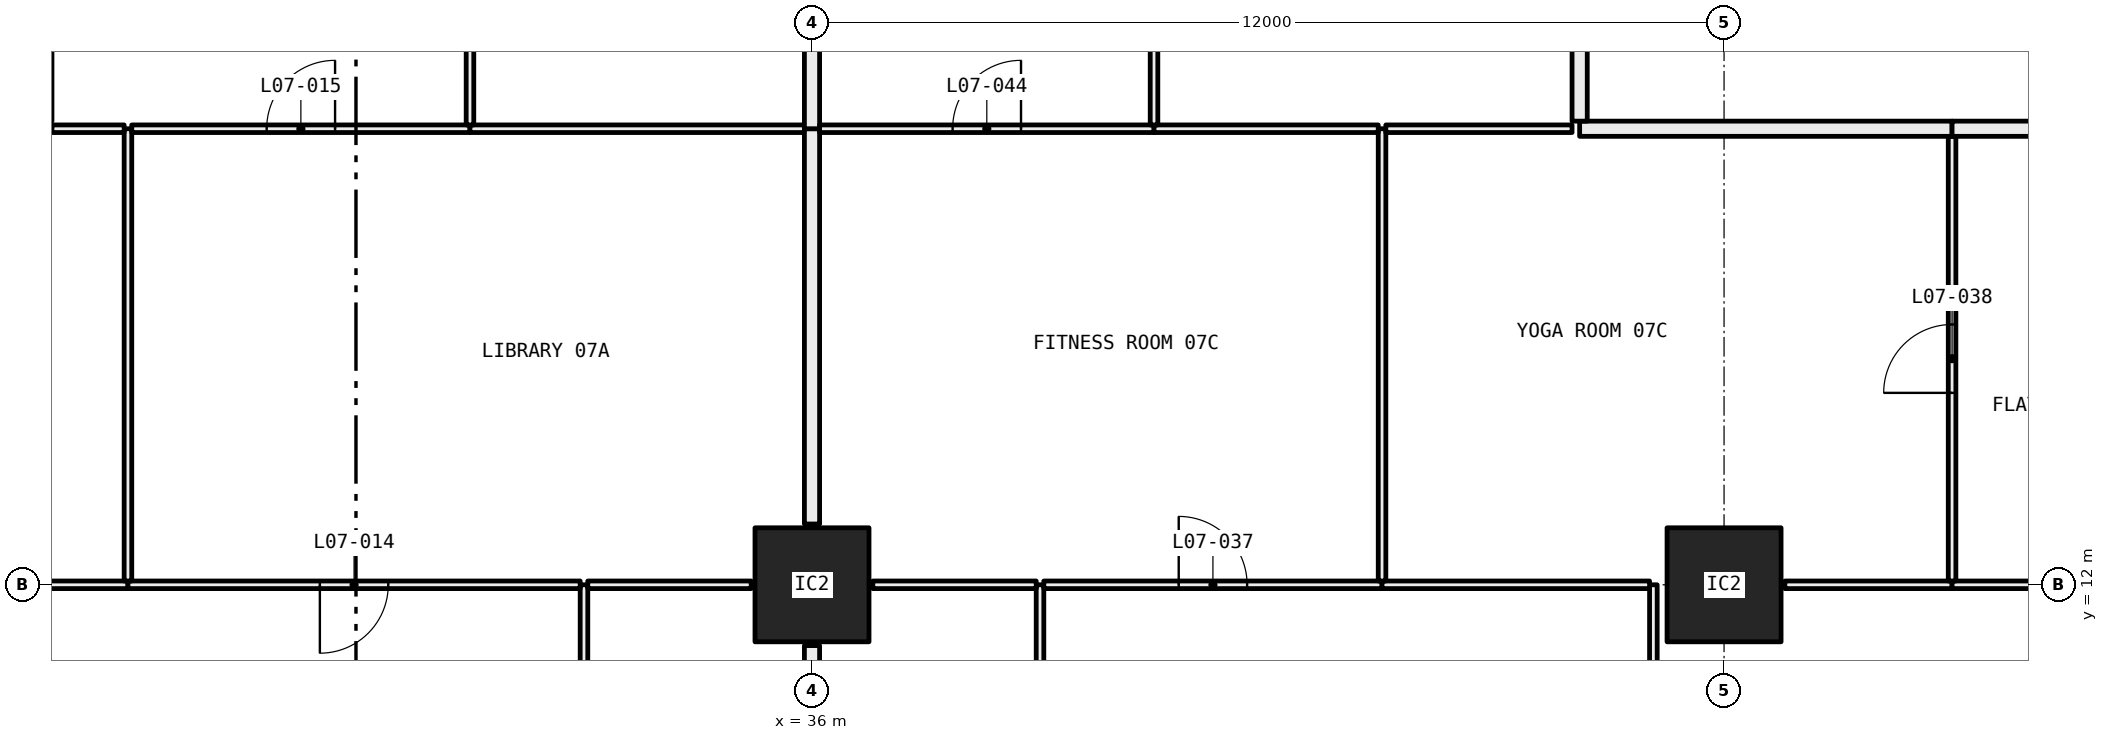
"""IFC4 building model, lengths in metres.
Left out: names, types, materials, properties, quantities, classifications, styles, units other than length and angle.
Written with IfcOpenShell. Run it as: python <this file> out.ifc"""

import sys

from ifc_helpers import new_model, si_unit, direction, frame, frame_2d, origin, origin_2d, place, context, subcontext, project, spatial, rectangle, hollow_rectangle, extrude, element, fill, save


model = new_model("IFC4")
c1 = context("Model", 3, precision=1e-05, world=origin(), true_north=direction((0.0, 1.0)))
c2 = subcontext(c1, "Body", "Model", "MODEL_VIEW")
j1 = project(units=[si_unit("LENGTHUNIT", "METRE"), si_unit("PLANEANGLEUNIT", "RADIAN")], contexts=[c1])
p1 = place(None, origin())
s1 = spatial("IfcSite", under=j1, at=p1, CompositionType="ELEMENT")
p2 = place(p1, origin())
s2 = spatial("IfcBuilding", under=s1, at=p2, CompositionType="ELEMENT")
p3 = place(p2, frame((0.0, 0.0, 36.9)))
s3 = spatial("IfcBuildingStorey", under=s2, at=p3, CompositionType="ELEMENT", Elevation=36.9)
for number, where, z_axis, x_axis in (
    (1, (36.0, 12.0, 0.0), (0.0, 0.0, 1.0), (1.0, 0.0, 0.0)),
    (2, (48.0, 12.0, 0.0), (0.0, 0.0, 1.0), (1.0, 0.0, 0.0)),
):
    element("IfcColumn", number, at=place(p3, frame(where, z_axis=z_axis, x_axis=x_axis)), inside=s3, PredefinedType="COLUMN", context=c2, shape_type="SweptSolid", body=[
        extrude(hollow_rectangle(XDim=1.5, YDim=1.5, WallThickness=0.065, at=origin_2d()), origin(), (0.0, 0.0, 1.0), 3.05),
    ])
p4 = place(p3, frame((33.0, 6.05, 0.0), z_axis=(0.0, 0.0, 1.0), x_axis=(0.0, 1.0, 0.0)))
e3 = element("IfcWall", 3, at=p4, inside=s3, PredefinedType="PARTITIONING", context=c2, shape_type="SweptSolid", body=[
    extrude(rectangle(XDim=5.95, YDim=0.1, at=frame_2d((2.975, 0.0))), origin(), (0.0, 0.0, 1.0), 2.45),
])
p5 = place(p4, frame((2.525, 0.0, 0.0)))
e4 = element("IfcOpeningElement", 4, at=p5, cuts=e3, PredefinedType="OPENING", context=c2, shape_type="SweptSolid", body=[
    extrude(rectangle(XDim=0.9, YDim=2.1, at=frame_2d((0.45, 1.05))), frame((0.0, 0.06, 0.0), z_axis=(0.0, -1.0, 0.0), x_axis=(1.0, 0.0, 0.0)), (0.0, 0.0, 1.0), 0.12),
])
p6 = place(p3, frame((27.0, 12.0, 0.0), z_axis=(0.0, 0.0, 1.0), x_axis=(-1.0, 0.0, 0.0)))
e5 = element("IfcWall", 5, at=p6, inside=s3, PredefinedType="PARTITIONING", context=c2, shape_type="SweptSolid", body=[
    extrude(rectangle(XDim=2.2, YDim=0.1, at=frame_2d((1.1, 0.0))), origin(), (0.0, 0.0, 1.0), 2.45),
])
p7 = place(p3, frame((32.95, 12.0, 0.0), z_axis=(0.0, 0.0, 1.0), x_axis=(-1.0, 0.0, 0.0)))
e6 = element("IfcWall", 6, at=p7, inside=s3, PredefinedType="PARTITIONING", context=c2, shape_type="SweptSolid", body=[
    extrude(rectangle(XDim=5.95, YDim=0.1, at=frame_2d((2.975, 0.0))), origin(), (0.0, 0.0, 1.0), 2.45),
])
p8 = place(p7, frame((2.525, 0.0, 0.0)))
e7 = element("IfcOpeningElement", 7, at=p8, cuts=e6, PredefinedType="OPENING", context=c2, shape_type="SweptSolid", body=[
    extrude(rectangle(XDim=0.9, YDim=2.1, at=frame_2d((0.45, 1.05))), frame((0.0, 0.06, 0.0), z_axis=(0.0, -1.0, 0.0), x_axis=(1.0, 0.0, 0.0)), (0.0, 0.0, 1.0), 0.12),
])
p9 = place(p3, frame((35.2, 12.0, 0.0), z_axis=(0.0, 0.0, 1.0), x_axis=(-1.0, 0.0, 0.0)))
e8 = element("IfcWall", 8, at=p9, inside=s3, PredefinedType="PARTITIONING", context=c2, shape_type="SweptSolid", body=[
    extrude(rectangle(XDim=2.15, YDim=0.1, at=frame_2d((1.075, 0.0))), origin(), (0.0, 0.0, 1.0), 2.45),
])
p10 = place(p3, frame((36.0, 6.0, 0.0), z_axis=(0.0, 0.0, 1.0), x_axis=(0.0, 1.0, 0.0)))
e9 = element("IfcWall", 9, at=p10, inside=s3, PredefinedType="PARTITIONING", context=c2, shape_type="SweptSolid", body=[
    extrude(rectangle(XDim=5.2, YDim=0.2, at=frame_2d((2.6, 0.0))), origin(), (0.0, 0.0, 1.0), 2.45),
])
p11 = place(p3, frame((27.0, 12.05, 0.0), z_axis=(0.0, 0.0, 1.0), x_axis=(0.0, 1.0, 0.0)))
e10 = element("IfcWall", 10, at=p11, inside=s3, PredefinedType="PARTITIONING", context=c2, shape_type="SweptSolid", body=[
    extrude(rectangle(XDim=5.95, YDim=0.1, at=frame_2d((2.975, 0.0))), origin(), (0.0, 0.0, 1.0), 2.45),
])
p12 = place(p3, frame((26.95, 18.0, 0.0), z_axis=(0.0, 0.0, 1.0), x_axis=(-1.0, 0.0, 0.0)))
e11 = element("IfcWall", 11, at=p12, inside=s3, PredefinedType="PARTITIONING", context=c2, shape_type="SweptSolid", body=[
    extrude(rectangle(XDim=0.95, YDim=0.1, at=frame_2d((0.475, 0.0))), origin(), (0.0, 0.0, 1.0), 3.05),
])
p13 = place(p3, frame((31.5, 18.0, 0.0), z_axis=(0.0, 0.0, 1.0), x_axis=(-1.0, 0.0, 0.0)))
e12 = element("IfcWall", 12, at=p13, inside=s3, PredefinedType="PARTITIONING", context=c2, shape_type="SweptSolid", body=[
    extrude(rectangle(XDim=4.45, YDim=0.1, at=frame_2d((2.225, 0.0))), origin(), (0.0, 0.0, 1.0), 3.05),
])
p14 = place(p13, frame((1.775, 0.0, 0.0)))
e13 = element("IfcOpeningElement", 13, at=p14, cuts=e12, PredefinedType="OPENING", context=c2, shape_type="SweptSolid", body=[
    extrude(rectangle(XDim=0.9, YDim=2.1, at=frame_2d((0.45, 1.05))), frame((0.0, 0.06, 0.0), z_axis=(0.0, -1.0, 0.0), x_axis=(1.0, 0.0, 0.0)), (0.0, 0.0, 1.0), 0.12),
])
p15 = place(p3, frame((35.9, 18.0, 0.0), z_axis=(0.0, 0.0, 1.0), x_axis=(-1.0, 0.0, 0.0)))
e14 = element("IfcWall", 14, at=p15, inside=s3, PredefinedType="PARTITIONING", context=c2, shape_type="SweptSolid", body=[
    extrude(rectangle(XDim=4.4, YDim=0.1, at=frame_2d((2.2, 0.0))), origin(), (0.0, 0.0, 1.0), 3.05),
])
p16 = place(p3, frame((36.0, 12.8, 0.0), z_axis=(0.0, 0.0, 1.0), x_axis=(0.0, 1.0, 0.0)))
e15 = element("IfcWall", 15, at=p16, inside=s3, PredefinedType="PARTITIONING", context=c2, shape_type="SweptSolid", body=[
    extrude(rectangle(XDim=5.2, YDim=0.2, at=frame_2d((2.6, 0.0))), origin(), (0.0, 0.0, 1.0), 2.45),
])
p17 = place(p3, frame((31.5, 18.05, 0.0), z_axis=(0.0, 0.0, 1.0), x_axis=(0.0, 1.0, 0.0)))
e16 = element("IfcWall", 16, at=p17, inside=s3, PredefinedType="PARTITIONING", context=c2, shape_type="SweptSolid", body=[
    extrude(rectangle(XDim=6.25, YDim=0.1, at=frame_2d((3.125, 0.0))), origin(), (0.0, 0.0, 1.0), 2.45),
])
p18 = place(p17, frame((2.675, 0.0, 0.0)))
e17 = element("IfcOpeningElement", 17, at=p18, cuts=e16, PredefinedType="OPENING", context=c2, shape_type="SweptSolid", body=[
    extrude(rectangle(XDim=0.9, YDim=2.1, at=frame_2d((0.45, 1.05))), frame((0.0, 0.06, 0.0), z_axis=(0.0, -1.0, 0.0), x_axis=(1.0, 0.0, 0.0)), (0.0, 0.0, 1.0), 0.12),
])
p19 = place(p3, frame((36.0, 18.0, 0.0), z_axis=(0.0, 0.0, 1.0), x_axis=(0.0, 1.0, 0.0)))
e18 = element("IfcWall", 18, at=p19, inside=s3, PredefinedType="PARTITIONING", context=c2, shape_type="SweptSolid", body=[
    extrude(rectangle(XDim=5.2, YDim=0.2, at=frame_2d((2.6, 0.0))), origin(), (0.0, 0.0, 1.0), 2.45),
])
p20 = place(p3, frame((39.0, 6.05, 0.0), z_axis=(0.0, 0.0, 1.0), x_axis=(0.0, 1.0, 0.0)))
e19 = element("IfcWall", 19, at=p20, inside=s3, PredefinedType="PARTITIONING", context=c2, shape_type="SweptSolid", body=[
    extrude(rectangle(XDim=5.95, YDim=0.1, at=frame_2d((2.975, 0.0))), origin(), (0.0, 0.0, 1.0), 2.45),
])
p21 = place(p20, frame((2.525, 0.0, 0.0)))
e20 = element("IfcOpeningElement", 20, at=p21, cuts=e19, PredefinedType="OPENING", context=c2, shape_type="SweptSolid", body=[
    extrude(rectangle(XDim=0.9, YDim=2.1, at=frame_2d((0.45, 1.05))), frame((0.0, 0.06, 0.0), z_axis=(0.0, -1.0, 0.0), x_axis=(1.0, 0.0, 0.0)), (0.0, 0.0, 1.0), 0.12),
])
p22 = place(p3, frame((38.95, 12.0, 0.0), z_axis=(0.0, 0.0, 1.0), x_axis=(-1.0, 0.0, 0.0)))
e21 = element("IfcWall", 21, at=p22, inside=s3, PredefinedType="PARTITIONING", context=c2, shape_type="SweptSolid", body=[
    extrude(rectangle(XDim=2.15, YDim=0.1, at=frame_2d((1.075, 0.0))), origin(), (0.0, 0.0, 1.0), 2.45),
])
p23 = place(p3, frame((47.07, 6.05, 0.0), z_axis=(0.0, 0.0, 1.0), x_axis=(0.0, 1.0, 0.0)))
e22 = element("IfcWall", 22, at=p23, inside=s3, PredefinedType="PARTITIONING", context=c2, shape_type="SweptSolid", body=[
    extrude(rectangle(XDim=5.95, YDim=0.1, at=frame_2d((2.975, 0.0))), origin(), (0.0, 0.0, 1.0), 2.45),
])
p24 = place(p23, frame((2.525, 0.0, 0.0)))
e23 = element("IfcOpeningElement", 23, at=p24, cuts=e22, PredefinedType="OPENING", context=c2, shape_type="SweptSolid", body=[
    extrude(rectangle(XDim=0.9, YDim=2.1, at=frame_2d((0.45, 1.05))), frame((0.0, 0.06, 0.0), z_axis=(0.0, -1.0, 0.0), x_axis=(1.0, 0.0, 0.0)), (0.0, 0.0, 1.0), 0.12),
])
p25 = place(p3, frame((43.5, 12.0, 0.0), z_axis=(0.0, 0.0, 1.0), x_axis=(-1.0, 0.0, 0.0)))
e24 = element("IfcWall", 24, at=p25, inside=s3, PredefinedType="PARTITIONING", context=c2, shape_type="SweptSolid", body=[
    extrude(rectangle(XDim=4.45, YDim=0.1, at=frame_2d((2.225, 0.0))), origin(), (0.0, 0.0, 1.0), 2.45),
])
p26 = place(p25, frame((1.775, 0.0, 0.0)))
e25 = element("IfcOpeningElement", 25, at=p26, cuts=e24, PredefinedType="OPENING", context=c2, shape_type="SweptSolid", body=[
    extrude(rectangle(XDim=0.9, YDim=2.1, at=frame_2d((0.45, 1.05))), frame((0.0, 0.06, 0.0), z_axis=(0.0, -1.0, 0.0), x_axis=(1.0, 0.0, 0.0)), (0.0, 0.0, 1.0), 0.12),
])
p27 = place(p3, frame((47.02, 12.0, 0.0), z_axis=(0.0, 0.0, 1.0), x_axis=(-1.0, 0.0, 0.0)))
e26 = element("IfcWall", 26, at=p27, inside=s3, PredefinedType="PARTITIONING", context=c2, shape_type="SweptSolid", body=[
    extrude(rectangle(XDim=3.52, YDim=0.1, at=frame_2d((1.76, 0.0))), origin(), (0.0, 0.0, 1.0), 2.45),
])
p28 = place(p3, frame((51.0, 12.0, 0.0), z_axis=(0.0, 0.0, 1.0), x_axis=(-1.0, 0.0, 0.0)))
e27 = element("IfcWall", 27, at=p28, inside=s3, PredefinedType="PARTITIONING", context=c2, shape_type="SweptSolid", body=[
    extrude(rectangle(XDim=2.2, YDim=0.1, at=frame_2d((1.1, 0.0))), origin(), (0.0, 0.0, 1.0), 2.45),
])
p29 = place(p3, frame((55.09, 12.0, 0.0), z_axis=(0.0, 0.0, 1.0), x_axis=(-1.0, 0.0, 0.0)))
e28 = element("IfcWall", 28, at=p29, inside=s3, PredefinedType="PARTITIONING", context=c2, shape_type="SweptSolid", body=[
    extrude(rectangle(XDim=4.09, YDim=0.1, at=frame_2d((2.045, 0.0))), origin(), (0.0, 0.0, 1.0), 2.45),
])
p30 = place(p29, frame((1.595, 0.0, 0.0)))
e29 = element("IfcOpeningElement", 29, at=p30, cuts=e28, PredefinedType="OPENING", context=c2, shape_type="SweptSolid", body=[
    extrude(rectangle(XDim=0.9, YDim=2.1, at=frame_2d((0.45, 1.05))), frame((0.0, 0.06, 0.0), z_axis=(0.0, -1.0, 0.0), x_axis=(1.0, 0.0, 0.0)), (0.0, 0.0, 1.0), 0.12),
])
p31 = place(p3, frame((43.5, 12.05, 0.0), z_axis=(0.0, 0.0, 1.0), x_axis=(0.0, 1.0, 0.0)))
e30 = element("IfcWall", 30, at=p31, inside=s3, PredefinedType="PARTITIONING", context=c2, shape_type="SweptSolid", body=[
    extrude(rectangle(XDim=5.95, YDim=0.1, at=frame_2d((2.975, 0.0))), origin(), (0.0, 0.0, 1.0), 2.45),
])
p32 = place(p3, frame((40.5, 18.0, 0.0), z_axis=(0.0, 0.0, 1.0), x_axis=(-1.0, 0.0, 0.0)))
e31 = element("IfcWall", 31, at=p32, inside=s3, PredefinedType="PARTITIONING", context=c2, shape_type="SweptSolid", body=[
    extrude(rectangle(XDim=4.4, YDim=0.1, at=frame_2d((2.2, 0.0))), origin(), (0.0, 0.0, 1.0), 3.05),
])
p33 = place(p32, frame((1.75, 0.0, 0.0)))
e32 = element("IfcOpeningElement", 32, at=p33, cuts=e31, PredefinedType="OPENING", context=c2, shape_type="SweptSolid", body=[
    extrude(rectangle(XDim=0.9, YDim=2.1, at=frame_2d((0.45, 1.05))), frame((0.0, 0.06, 0.0), z_axis=(0.0, -1.0, 0.0), x_axis=(1.0, 0.0, 0.0)), (0.0, 0.0, 1.0), 0.12),
])
p34 = place(p3, frame((43.45, 18.0, 0.0), z_axis=(0.0, 0.0, 1.0), x_axis=(-1.0, 0.0, 0.0)))
e33 = element("IfcWall", 33, at=p34, inside=s3, PredefinedType="PARTITIONING", context=c2, shape_type="SweptSolid", body=[
    extrude(rectangle(XDim=2.95, YDim=0.1, at=frame_2d((1.475, 0.0))), origin(), (0.0, 0.0, 1.0), 3.05),
])
p35 = place(p3, frame((51.0, 12.05, 0.0), z_axis=(0.0, 0.0, 1.0), x_axis=(0.0, 1.0, 0.0)))
e34 = element("IfcWall", 34, at=p35, inside=s3, PredefinedType="PARTITIONING", context=c2, shape_type="SweptSolid", body=[
    extrude(rectangle(XDim=5.85, YDim=0.1, at=frame_2d((2.925, 0.0))), origin(), (0.0, 0.0, 1.0), 2.45),
])
p36 = place(p35, frame((2.475, 0.0, 0.0)))
e35 = element("IfcOpeningElement", 35, at=p36, cuts=e34, PredefinedType="OPENING", context=c2, shape_type="SweptSolid", body=[
    extrude(rectangle(XDim=0.9, YDim=2.1, at=frame_2d((0.45, 1.05))), frame((0.0, 0.06, 0.0), z_axis=(0.0, -1.0, 0.0), x_axis=(1.0, 0.0, 0.0)), (0.0, 0.0, 1.0), 0.12),
])
p37 = place(p3, frame((46.0, 18.0, 0.0), z_axis=(0.0, 0.0, 1.0), x_axis=(-1.0, 0.0, 0.0)))
e36 = element("IfcWall", 36, at=p37, inside=s3, PredefinedType="PARTITIONING", context=c2, shape_type="SweptSolid", body=[
    extrude(rectangle(XDim=2.45, YDim=0.1, at=frame_2d((1.225, 0.0))), origin(), (0.0, 0.0, 1.0), 3.05),
])
p38 = place(p3, frame((51.0, 18.0, 0.0), z_axis=(0.0, 0.0, 1.0), x_axis=(-1.0, 0.0, 0.0)))
e37 = element("IfcWall", 37, at=p38, inside=s3, PredefinedType="PARTITIONING", context=c2, shape_type="SweptSolid", body=[
    extrude(rectangle(XDim=4.9, YDim=0.2, at=frame_2d((2.45, 0.0))), origin(), (0.0, 0.0, 1.0), 3.05),
])
p39 = place(p3, frame((55.5, 18.0, 0.0), z_axis=(0.0, 0.0, 1.0), x_axis=(-1.0, 0.0, 0.0)))
e38 = element("IfcWall", 38, at=p39, inside=s3, PredefinedType="PARTITIONING", context=c2, shape_type="SweptSolid", body=[
    extrude(rectangle(XDim=4.5, YDim=0.2, at=frame_2d((2.25, 0.0))), origin(), (0.0, 0.0, 1.0), 3.05),
])
p40 = place(p39, frame((1.75, 0.0, 0.0)))
e39 = element("IfcOpeningElement", 39, at=p40, cuts=e38, PredefinedType="OPENING", context=c2, shape_type="SweptSolid", body=[
    extrude(rectangle(XDim=1.0, YDim=2.1, at=frame_2d((0.5, 1.05))), frame((0.0, 0.11, 0.0), z_axis=(0.0, -1.0, 0.0), x_axis=(1.0, 0.0, 0.0)), (0.0, 0.0, 1.0), 0.22),
])
p41 = place(p3, frame((40.5, 18.05, 0.0), z_axis=(0.0, 0.0, 1.0), x_axis=(0.0, 1.0, 0.0)))
e40 = element("IfcWall", 40, at=p41, inside=s3, PredefinedType="PARTITIONING", context=c2, shape_type="SweptSolid", body=[
    extrude(rectangle(XDim=6.175, YDim=0.1, at=frame_2d((3.087, 0.0))), origin(), (0.0, 0.0, 1.0), 2.45),
])
p42 = place(p41, frame((2.637, 0.0, 0.0)))
e41 = element("IfcOpeningElement", 41, at=p42, cuts=e40, PredefinedType="OPENING", context=c2, shape_type="SweptSolid", body=[
    extrude(rectangle(XDim=0.9, YDim=2.1, at=frame_2d((0.45, 1.05))), frame((0.0, 0.06, 0.0), z_axis=(0.0, -1.0, 0.0), x_axis=(1.0, 0.0, 0.0)), (0.0, 0.0, 1.0), 0.12),
])
p43 = place(p3, frame((46.1, 18.1, 0.0), z_axis=(0.0, 0.0, 1.0), x_axis=(0.0, 1.0, 0.0)))
e42 = element("IfcWall", 42, at=p43, inside=s3, PredefinedType="PARTITIONING", context=c2, shape_type="SweptSolid", body=[
    extrude(rectangle(XDim=6.2, YDim=0.2, at=frame_2d((3.1, 0.0))), origin(), (0.0, 0.0, 1.0), 2.45),
])
p44 = place(p8, origin())
e43 = element("IfcDoor", 43, at=p44, inside=s3, OperationType="SINGLE_SWING_LEFT", PredefinedType="DOOR", context=c2, shape_type="SweptSolid", body=[
    extrude(rectangle(XDim=0.9, YDim=2.1, at=frame_2d((0.45, 1.05))), frame((0.0, 0.025, 0.0), z_axis=(0.0, -1.0, 0.0), x_axis=(1.0, 0.0, 0.0)), (0.0, 0.0, 1.0), 0.05),
])
fill(e7, e43)
p45 = place(p14, frame((0.9, 0.0, 0.0), x_axis=(-1.0, 0.0, 0.0)))
e44 = element("IfcDoor", 44, at=p45, inside=s3, OperationType="SINGLE_SWING_LEFT", PredefinedType="DOOR", context=c2, shape_type="SweptSolid", body=[
    extrude(rectangle(XDim=0.9, YDim=2.1, at=frame_2d((0.45, 1.05))), frame((0.0, 0.025, 0.0), z_axis=(0.0, -1.0, 0.0), x_axis=(1.0, 0.0, 0.0)), (0.0, 0.0, 1.0), 0.05),
])
fill(e13, e44)
p46 = place(p26, frame((0.9, 0.0, 0.0), x_axis=(-1.0, 0.0, 0.0)))
e45 = element("IfcDoor", 45, at=p46, inside=s3, OperationType="SINGLE_SWING_RIGHT", PredefinedType="DOOR", context=c2, shape_type="SweptSolid", body=[
    extrude(rectangle(XDim=0.9, YDim=2.1, at=frame_2d((0.45, 1.05))), frame((0.0, 0.025, 0.0), z_axis=(0.0, -1.0, 0.0), x_axis=(1.0, 0.0, 0.0)), (0.0, 0.0, 1.0), 0.05),
])
fill(e25, e45)
p47 = place(p36, origin())
e46 = element("IfcDoor", 46, at=p47, inside=s3, OperationType="SINGLE_SWING_RIGHT", PredefinedType="DOOR", context=c2, shape_type="SweptSolid", body=[
    extrude(rectangle(XDim=0.9, YDim=2.1, at=frame_2d((0.45, 1.05))), frame((0.0, 0.025, 0.0), z_axis=(0.0, -1.0, 0.0), x_axis=(1.0, 0.0, 0.0)), (0.0, 0.0, 1.0), 0.05),
])
fill(e35, e46)
p48 = place(p33, frame((0.9, 0.0, 0.0), x_axis=(-1.0, 0.0, 0.0)))
e47 = element("IfcDoor", 47, at=p48, inside=s3, OperationType="SINGLE_SWING_LEFT", PredefinedType="DOOR", context=c2, shape_type="SweptSolid", body=[
    extrude(rectangle(XDim=0.9, YDim=2.1, at=frame_2d((0.45, 1.05))), frame((0.0, 0.025, 0.0), z_axis=(0.0, -1.0, 0.0), x_axis=(1.0, 0.0, 0.0)), (0.0, 0.0, 1.0), 0.05),
])
fill(e32, e47)
save(model, sys.argv[1])
